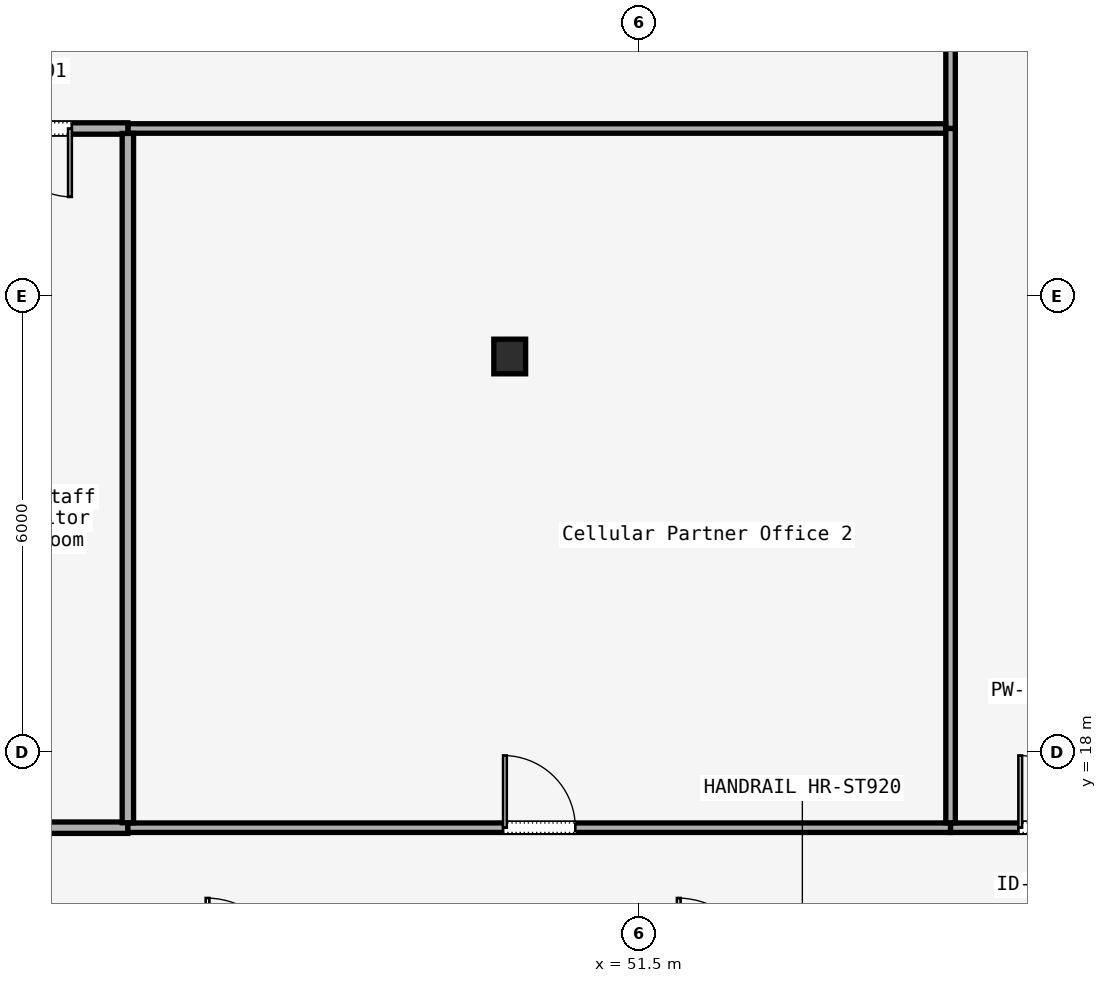
"""IFC4 building model, lengths in metres.
Left out: names, types, materials, properties, quantities, classifications, styles, units other than length and angle.
Written with IfcOpenShell. Run it as: python <this file> out.ifc"""

import sys

from ifc_helpers import new_model, si_unit, direction, frame, frame_2d, origin, origin_2d, place, context, subcontext, project, spatial, rectangle, i_section, extrude, element, fill, save


model = new_model("IFC4")
c1 = context("Model", 3, precision=1e-05, world=origin(), true_north=direction((0.0, 1.0)))
c2 = subcontext(c1, "Body", "Model", "MODEL_VIEW")
j1 = project(units=[si_unit("LENGTHUNIT", "METRE"), si_unit("PLANEANGLEUNIT", "RADIAN")], contexts=[c1])
p1 = place(None, origin())
s1 = spatial("IfcSite", under=j1, at=p1, CompositionType="ELEMENT")
p2 = place(p1, origin())
s2 = spatial("IfcBuilding", under=s1, at=p2, CompositionType="ELEMENT")
p3 = place(p2, frame((0.0, 0.0, 108.2)))
s3 = spatial("IfcBuildingStorey", under=s2, at=p3, CompositionType="ELEMENT", Elevation=108.2)
p4 = place(p3, frame((49.8, 23.2, 0.0), z_axis=(0.0, 0.0, 1.0), x_axis=(1.0, 0.0, 0.0)))
e1 = element("IfcColumn", 1, at=p4, inside=s3, PredefinedType="COLUMN", context=c2, shape_type="SweptSolid", body=[
    extrude(i_section(OverallWidth=0.418, OverallDepth=0.456, WebThickness=0.042, FlangeThickness=0.067, FilletRadius=0.015, at=origin_2d()), origin(), (0.0, 0.0, 1.0), 3.52),
])
p5 = place(p3, frame((55.6, 27.935, 0.0), z_axis=(0.0, 0.0, 1.0), x_axis=(0.0, -1.0, 0.0)))
e2 = element("IfcWall", 2, at=p5, inside=s3, PredefinedType="PARTITIONING", context=c2, shape_type="SweptSolid", body=[
    extrude(rectangle(XDim=1.735, YDim=0.125, at=frame_2d((0.868, 0.0))), origin(), (0.0, 0.0, 1.0), 2.95),
])
p6 = place(p3, frame((55.535, 26.2, 0.0), z_axis=(0.0, 0.0, 1.0), x_axis=(-1.0, 0.0, 0.0)))
e3 = element("IfcWall", 3, at=p6, inside=s3, PredefinedType="PARTITIONING", context=c2, shape_type="SweptSolid", body=[
    extrude(rectangle(XDim=10.759, YDim=0.125, at=frame_2d((5.379, 0.0))), origin(), (0.0, 0.0, 1.0), 2.95),
])
p7 = place(p3, frame((44.776, 26.2, 0.0), z_axis=(0.0, 0.0, 1.0), x_axis=(-1.0, 0.0, 0.0)))
e4 = element("IfcWall", 4, at=p7, inside=s3, PredefinedType="PARTITIONING", context=c2, shape_type="SweptSolid", body=[
    extrude(rectangle(XDim=2.376, YDim=0.15, at=frame_2d((1.188, 0.0))), origin(), (0.0, 0.0, 1.0), 2.95),
])
p8 = place(p7, frame((0.738, 0.0, 0.0)))
e5 = element("IfcOpeningElement", 5, at=p8, cuts=e4, PredefinedType="OPENING", context=c2, shape_type="SweptSolid", body=[
    extrude(rectangle(XDim=0.9, YDim=2.15, at=frame_2d((0.45, 1.075))), frame((0.0, 0.075, 0.0), z_axis=(0.0, -1.0, 0.0), x_axis=(1.0, 0.0, 0.0)), (0.0, 0.0, 1.0), 0.15),
])
p9 = place(p3, frame((42.4, 17.0, 0.0), z_axis=(0.0, 0.0, 1.0), x_axis=(1.0, 0.0, 0.0)))
e6 = element("IfcWall", 6, at=p9, inside=s3, PredefinedType="PARTITIONING", context=c2, shape_type="SweptSolid", body=[
    extrude(rectangle(XDim=2.376, YDim=0.15, at=frame_2d((1.188, 0.0))), origin(), (0.0, 0.0, 1.0), 2.95),
])
p10 = place(p3, frame((44.776, 17.0, 0.0), z_axis=(0.0, 0.0, 1.0), x_axis=(1.0, 0.0, 0.0)))
e7 = element("IfcWall", 7, at=p10, inside=s3, PredefinedType="PARTITIONING", context=c2, shape_type="SweptSolid", body=[
    extrude(rectangle(XDim=10.824, YDim=0.125, at=frame_2d((5.412, 0.0))), origin(), (0.0, 0.0, 1.0), 2.95),
])
p11 = place(p10, frame((4.937, 0.0, 0.0)))
e8 = element("IfcOpeningElement", 8, at=p11, cuts=e7, PredefinedType="OPENING", context=c2, shape_type="SweptSolid", body=[
    extrude(rectangle(XDim=0.95, YDim=2.2, at=frame_2d((0.475, 1.1))), frame((0.0, 0.062, 0.0), z_axis=(0.0, -1.0, 0.0), x_axis=(1.0, 0.0, 0.0)), (0.0, 0.0, 1.0), 0.125),
])
p12 = place(p3, frame((55.6, 17.0, 0.0), z_axis=(0.0, 0.0, 1.0), x_axis=(1.0, 0.0, 0.0)))
e9 = element("IfcWall", 9, at=p12, inside=s3, PredefinedType="PARTITIONING", context=c2, shape_type="SweptSolid", body=[
    extrude(rectangle(XDim=2.735, YDim=0.125, at=frame_2d((1.367, 0.0))), origin(), (0.0, 0.0, 1.0), 2.95),
])
p13 = place(p12, frame((0.893, 0.0, 0.0)))
e10 = element("IfcOpeningElement", 10, at=p13, cuts=e9, PredefinedType="OPENING", context=c2, shape_type="SweptSolid", body=[
    extrude(rectangle(XDim=0.95, YDim=2.2, at=frame_2d((0.475, 1.1))), frame((0.0, 0.062, 0.0), z_axis=(0.0, -1.0, 0.0), x_axis=(1.0, 0.0, 0.0)), (0.0, 0.0, 1.0), 0.125),
])
p14 = place(p3, frame((44.776, 26.135, 0.0), z_axis=(0.0, 0.0, 1.0), x_axis=(0.0, -1.0, 0.0)))
e11 = element("IfcWall", 11, at=p14, inside=s3, PredefinedType="PARTITIONING", context=c2, shape_type="SweptSolid", body=[
    extrude(rectangle(XDim=9.07, YDim=0.15, at=frame_2d((4.535, 0.0))), origin(), (0.0, 0.0, 1.0), 2.95),
])
p15 = place(p3, frame((55.6, 26.2, 0.0), z_axis=(0.0, 0.0, 1.0), x_axis=(0.0, -1.0, 0.0)))
e12 = element("IfcWall", 12, at=p15, inside=s3, PredefinedType="PARTITIONING", context=c2, shape_type="SweptSolid", body=[
    extrude(rectangle(XDim=9.135, YDim=0.125, at=frame_2d((4.567, 0.0))), origin(), (0.0, 0.0, 1.0), 2.95),
])
p16 = place(p8, origin())
e13 = element("IfcDoor", 13, at=p16, inside=s3, OperationType="SINGLE_SWING_RIGHT", PredefinedType="DOOR", context=c2, shape_type="SweptSolid", body=[
    extrude(rectangle(XDim=0.9, YDim=2.15, at=frame_2d((0.45, 1.075))), frame((0.0, 0.025, 0.0), z_axis=(0.0, -1.0, 0.0), x_axis=(1.0, 0.0, 0.0)), (0.0, 0.0, 1.0), 0.05),
])
fill(e5, e13)
p17 = place(p11, origin())
e14 = element("IfcDoor", 14, at=p17, inside=s3, OperationType="SINGLE_SWING_LEFT", PredefinedType="DOOR", context=c2, shape_type="SweptSolid", body=[
    extrude(rectangle(XDim=0.95, YDim=2.2, at=frame_2d((0.475, 1.1))), frame((0.0, 0.025, 0.0), z_axis=(0.0, -1.0, 0.0), x_axis=(1.0, 0.0, 0.0)), (0.0, 0.0, 1.0), 0.05),
])
fill(e8, e14)
p18 = place(p13, origin())
e15 = element("IfcDoor", 15, at=p18, inside=s3, OperationType="SINGLE_SWING_RIGHT", PredefinedType="DOOR", context=c2, shape_type="SweptSolid", body=[
    extrude(rectangle(XDim=0.95, YDim=2.2, at=frame_2d((0.475, 1.1))), frame((0.0, 0.025, 0.0), z_axis=(0.0, -1.0, 0.0), x_axis=(1.0, 0.0, 0.0)), (0.0, 0.0, 1.0), 0.05),
])
fill(e10, e15)
save(model, sys.argv[1])
